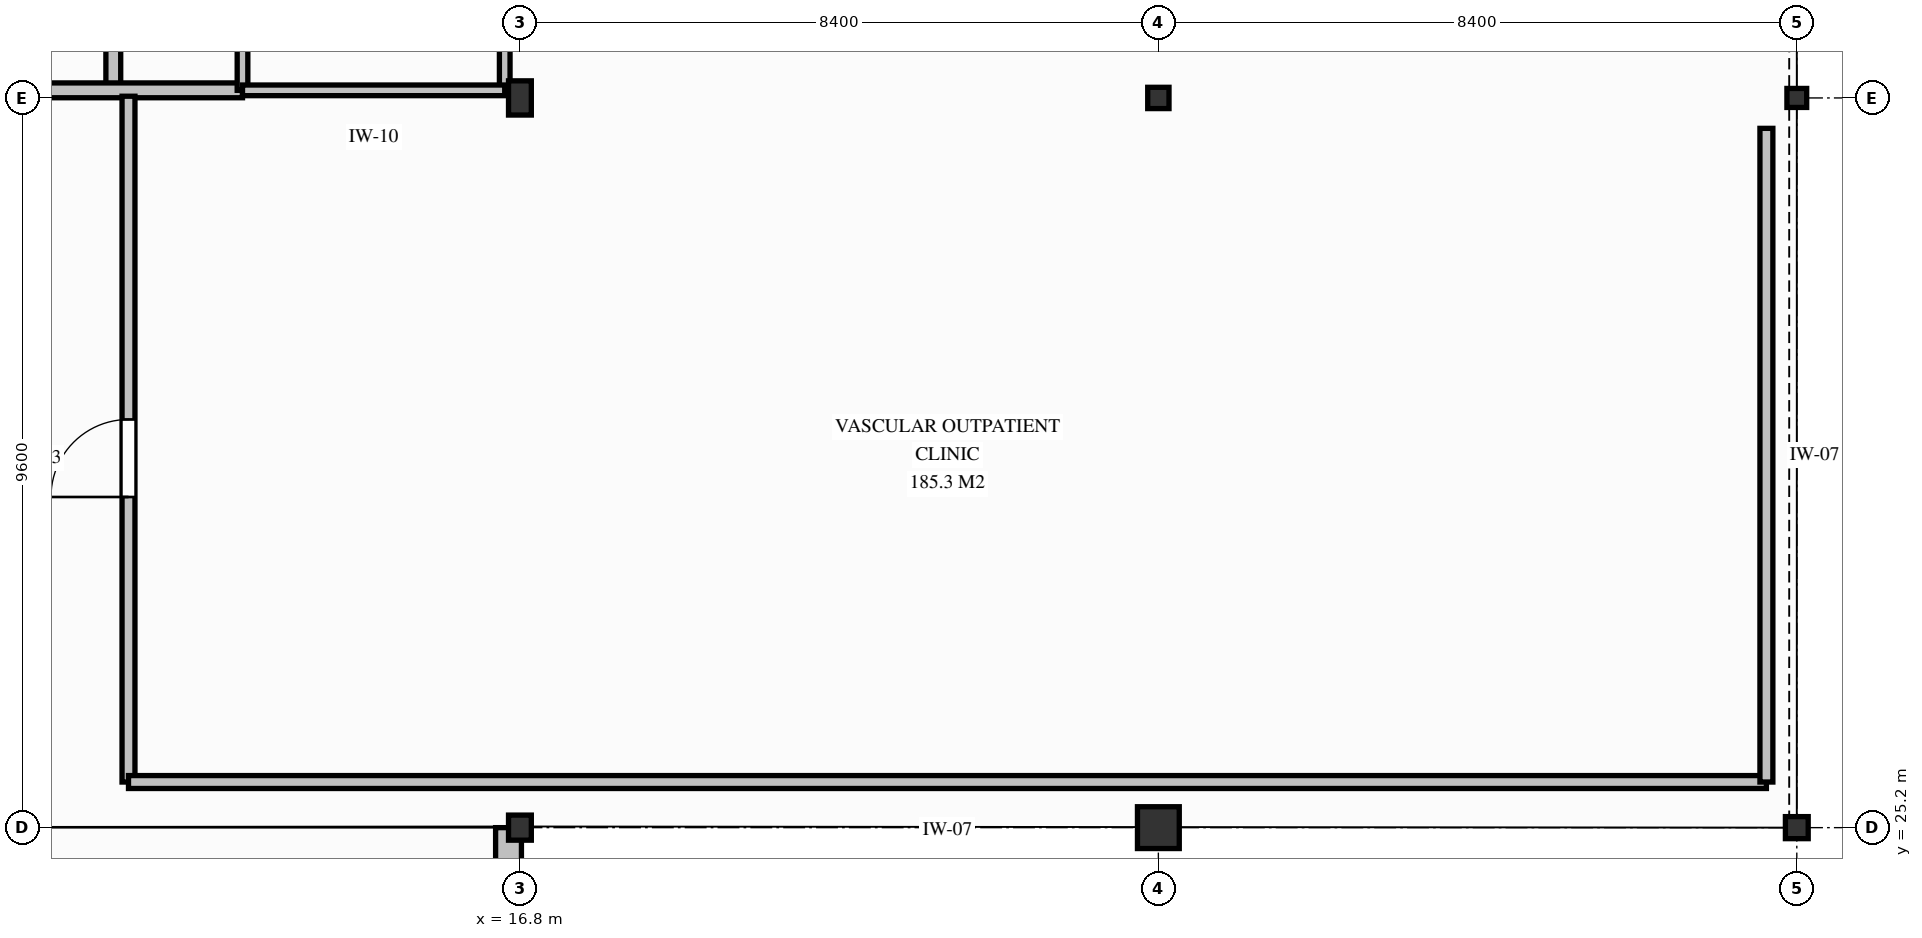
"""IFC4 building model, lengths in metres.
Left out: names, types, materials, properties, quantities, classifications, styles, units other than length and angle.
Written with IfcOpenShell. Run it as: python <this file> out.ifc"""

import sys

from ifc_helpers import new_model, si_unit, direction, frame, frame_2d, origin, origin_2d, place, context, subcontext, project, spatial, rectangle, circle, i_section, extrude, element, fill, save


model = new_model("IFC4")
c1 = context("Model", 3, precision=1e-05, world=origin(), true_north=direction((0.0, 1.0)))
c2 = subcontext(c1, "Body", "Model", "MODEL_VIEW")
j1 = project(units=[si_unit("LENGTHUNIT", "METRE"), si_unit("PLANEANGLEUNIT", "RADIAN")], contexts=[c1])
p1 = place(None, origin())
s1 = spatial("IfcSite", under=j1, at=p1, CompositionType="ELEMENT")
p2 = place(p1, origin())
s2 = spatial("IfcBuilding", under=s1, at=p2, CompositionType="ELEMENT")
p3 = place(p2, frame((0.0, 0.0, 4.5)))
s3 = spatial("IfcBuildingStorey", under=s2, at=p3, CompositionType="ELEMENT", Elevation=4.5)
p4 = place(p3, frame((16.8, 25.2, 0.0), z_axis=(0.0, 0.0, 1.0), x_axis=(1.0, 0.0, 0.0)))
e1 = element("IfcColumn", 1, at=p4, inside=s3, PredefinedType="COLUMN", context=c2, shape_type="SweptSolid", body=[
    extrude(i_section(OverallWidth=0.3, OverallDepth=0.33, WebThickness=0.01, FlangeThickness=0.017, FilletRadius=0.027, at=origin_2d()), origin(), (0.0, 0.0, 1.0), 4.5),
])
p5 = place(p3, frame((16.8, 34.8, 0.0), z_axis=(0.0, 0.0, 1.0), x_axis=(1.0, 0.0, 0.0)))
e2 = element("IfcColumn", 2, at=p5, inside=s3, PredefinedType="COLUMN", context=c2, shape_type="SweptSolid", body=[
    extrude(i_section(OverallWidth=0.3, OverallDepth=0.45, WebThickness=0.014, FlangeThickness=0.026, FilletRadius=0.027, at=origin_2d()), origin(), (0.0, 0.0, 1.0), 4.5),
])
p6 = place(p3, frame((25.2, 25.2, 0.0), z_axis=(0.0, 0.0, 1.0), x_axis=(1.0, 0.0, 0.0)))
e3 = element("IfcColumn", 3, at=p6, inside=s3, PredefinedType="COLUMN", context=c2, shape_type="SweptSolid", body=[
    extrude(circle(Radius=0.275, at=origin_2d()), origin(), (0.0, 0.0, 1.0), 4.5),
])
p7 = place(p3, frame((25.2, 34.8, 0.0), z_axis=(0.0, 0.0, 1.0), x_axis=(1.0, 0.0, 0.0)))
e4 = element("IfcColumn", 4, at=p7, inside=s3, PredefinedType="COLUMN", context=c2, shape_type="SweptSolid", body=[
    extrude(i_section(OverallWidth=0.28, OverallDepth=0.28, WebThickness=0.01, FlangeThickness=0.018, FilletRadius=0.024, at=origin_2d()), origin(), (0.0, 0.0, 1.0), 4.5),
])
p8 = place(p3, frame((33.6, 25.2, 0.0), z_axis=(0.0, 0.0, 1.0), x_axis=(1.0, 0.0, 0.0)))
e5 = element("IfcColumn", 5, at=p8, inside=s3, PredefinedType="COLUMN", context=c2, shape_type="SweptSolid", body=[
    extrude(i_section(OverallWidth=0.3, OverallDepth=0.29, WebThickness=0.009, FlangeThickness=0.014, FilletRadius=0.027, at=origin_2d()), origin(), (0.0, 0.0, 1.0), 4.5),
])
p9 = place(p3, frame((33.6, 34.8, 0.0), z_axis=(0.0, 0.0, 1.0), x_axis=(1.0, 0.0, 0.0)))
e6 = element("IfcColumn", 6, at=p9, inside=s3, PredefinedType="COLUMN", context=c2, shape_type="SweptSolid", body=[
    extrude(i_section(OverallWidth=0.26, OverallDepth=0.25, WebThickness=0.008, FlangeThickness=0.012, FilletRadius=0.024, at=origin_2d()), origin(), (0.0, 0.0, 1.0), 4.5),
])
p10 = place(p3, frame((16.65, 25.2, 0.0), z_axis=(0.0, 0.0, 1.0), x_axis=(0.0, -1.0, 0.0)))
e7 = element("IfcWall", 7, at=p10, inside=s3, PredefinedType="SOLIDWALL", context=c2, shape_type="SweptSolid", body=[
    extrude(rectangle(XDim=8.4, YDim=0.34, at=frame_2d((4.2, 0.0))), origin(), (0.0, 0.0, 1.0), 3.678),
])
p11 = place(p10, frame((3.475, 0.0, 0.85)))
e8 = element("IfcOpeningElement", 8, at=p11, cuts=e7, PredefinedType="OPENING", context=c2, shape_type="SweptSolid", body=[
    extrude(rectangle(XDim=1.45, YDim=1.75, at=frame_2d((0.725, 0.875))), frame((0.0, 0.18, 0.0), z_axis=(0.0, -1.0, 0.0), x_axis=(1.0, 0.0, 0.0)), (0.0, 0.0, 1.0), 0.36),
])
p12 = place(p3, frame((11.45, 34.9, 0.0), z_axis=(0.0, 0.0, 1.0), x_axis=(0.0, 1.0, 0.0)))
e9 = element("IfcWall", 9, at=p12, inside=s3, PredefinedType="PARTITIONING", context=c2, shape_type="SweptSolid", body=[
    extrude(rectangle(XDim=2.65, YDim=0.195, at=frame_2d((1.325, 0.0))), origin(), (0.0, 0.0, 1.0), 3.978),
])
p13 = place(p3, frame((8.35, 34.9, 0.0), z_axis=(0.0, 0.0, 1.0), x_axis=(1.0, 0.0, 0.0)))
e10 = element("IfcWall", 10, at=p13, inside=s3, PredefinedType="PARTITIONING", context=c2, shape_type="SweptSolid", body=[
    extrude(rectangle(XDim=4.8, YDim=0.195, at=frame_2d((2.4, 0.0))), origin(), (0.0, 0.0, 1.0), 3.778),
])
p14 = place(p13, frame((1.05, 0.0, 0.0)))
e11 = element("IfcOpeningElement", 11, at=p14, cuts=e10, PredefinedType="OPENING", context=c2, shape_type="SweptSolid", body=[
    extrude(rectangle(XDim=1.1, YDim=2.15, at=frame_2d((0.55, 1.075))), frame((0.0, 0.107, 0.0), z_axis=(0.0, -1.0, 0.0), x_axis=(1.0, 0.0, 0.0)), (0.0, 0.0, 1.0), 0.215),
])
p15 = place(p3, frame((13.15, 34.9, 0.0), z_axis=(0.0, 0.0, 1.0), x_axis=(0.0, 1.0, 0.0)))
e12 = element("IfcWall", 12, at=p15, inside=s3, PredefinedType="PARTITIONING", context=c2, shape_type="SweptSolid", body=[
    extrude(rectangle(XDim=7.82, YDim=0.14, at=frame_2d((3.91, 0.0))), origin(), (0.0, 0.0, 1.0), 3.978),
])
p16 = place(p15, frame((0.9, 0.0, 0.0)))
e13 = element("IfcOpeningElement", 13, at=p16, cuts=e12, PredefinedType="OPENING", context=c2, shape_type="SweptSolid", body=[
    extrude(rectangle(XDim=0.95, YDim=2.12, at=frame_2d((0.475, 1.06))), frame((0.0, 0.08, 0.0), z_axis=(0.0, -1.0, 0.0), x_axis=(1.0, 0.0, 0.0)), (0.0, 0.0, 1.0), 0.16),
])
p17 = place(p15, frame((3.55, 0.0, 0.0)))
e14 = element("IfcOpeningElement", 14, at=p17, cuts=e12, PredefinedType="OPENING", context=c2, shape_type="SweptSolid", body=[
    extrude(rectangle(XDim=0.98, YDim=2.14, at=frame_2d((0.49, 1.07))), frame((0.0, 0.08, 0.0), z_axis=(0.0, -1.0, 0.0), x_axis=(1.0, 0.0, 0.0)), (0.0, 0.0, 1.0), 0.16),
])
p18 = place(p15, frame((6.08, 0.0, 0.0)))
e15 = element("IfcOpeningElement", 15, at=p18, cuts=e12, PredefinedType="OPENING", context=c2, shape_type="SweptSolid", body=[
    extrude(rectangle(XDim=0.98, YDim=2.14, at=frame_2d((0.49, 1.07))), frame((0.0, 0.08, 0.0), z_axis=(0.0, -1.0, 0.0), x_axis=(1.0, 0.0, 0.0)), (0.0, 0.0, 1.0), 0.16),
])
p19 = place(p3, frame((16.6, 34.9, 0.0), z_axis=(0.0, 0.0, 1.0), x_axis=(0.0, 1.0, 0.0)))
e16 = element("IfcWall", 16, at=p19, inside=s3, PredefinedType="PARTITIONING", context=c2, shape_type="SweptSolid", body=[
    extrude(rectangle(XDim=7.82, YDim=0.14, at=frame_2d((3.91, 0.0))), origin(), (0.0, 0.0, 1.0), 3.628),
])
p20 = place(p3, frame((13.15, 34.9, 0.0), z_axis=(0.0, 0.0, 1.0), x_axis=(1.0, 0.0, 0.0)))
e17 = element("IfcWall", 17, at=p20, inside=s3, PredefinedType="PARTITIONING", context=c2, shape_type="SweptSolid", body=[
    extrude(rectangle(XDim=3.45, YDim=0.14, at=frame_2d((1.725, 0.0))), origin(), (0.0, 0.0, 1.0), 3.628),
])
p21 = place(p3, frame((11.65, 25.8, 0.0), z_axis=(0.0, 0.0, 1.0), x_axis=(0.0, 1.0, 0.0)))
e18 = element("IfcWall", 18, at=p21, inside=s3, PredefinedType="PARTITIONING", context=c2, shape_type="SweptSolid", body=[
    extrude(rectangle(XDim=9.022, YDim=0.17, at=frame_2d((4.511, 0.0))), origin(), (0.0, 0.0, 1.0), 3.928),
])
p22 = place(p21, frame((3.75, 0.0, 0.0)))
e19 = element("IfcOpeningElement", 19, at=p22, cuts=e18, PredefinedType="OPENING", context=c2, shape_type="SweptSolid", body=[
    extrude(rectangle(XDim=1.02, YDim=2.15, at=frame_2d((0.51, 1.075))), frame((0.0, 0.095, 0.0), z_axis=(0.0, -1.0, 0.0), x_axis=(1.0, 0.0, 0.0)), (0.0, 0.0, 1.0), 0.19),
])
p23 = place(p3, frame((33.2, 25.8, 0.0), z_axis=(0.0, 0.0, 1.0), x_axis=(-1.0, 0.0, 0.0)))
e20 = element("IfcWall", 20, at=p23, inside=s3, PredefinedType="PARTITIONING", context=c2, shape_type="SweptSolid", body=[
    extrude(rectangle(XDim=21.55, YDim=0.17, at=frame_2d((10.775, 0.0))), origin(), (0.0, 0.0, 1.0), 3.678),
])
p24 = place(p3, frame((33.2, 34.4, 0.0), z_axis=(0.0, 0.0, 1.0), x_axis=(0.0, -1.0, 0.0)))
e21 = element("IfcWall", 21, at=p24, inside=s3, PredefinedType="PARTITIONING", context=c2, shape_type="SweptSolid", body=[
    extrude(rectangle(XDim=8.6, YDim=0.17, at=frame_2d((4.3, 0.0))), origin(), (0.0, 0.0, 1.0), 4.23),
])
p25 = place(p22, origin())
e22 = element("IfcDoor", 22, at=p25, inside=s3, OperationType="SINGLE_SWING_LEFT", PredefinedType="DOOR", context=c2, shape_type="SweptSolid", body=[
    extrude(rectangle(XDim=1.02, YDim=2.15, at=frame_2d((0.51, 1.075))), frame((0.0, 0.025, 0.0), z_axis=(0.0, -1.0, 0.0), x_axis=(1.0, 0.0, 0.0)), (0.0, 0.0, 1.0), 0.05),
])
fill(e19, e22)
save(model, sys.argv[1])
